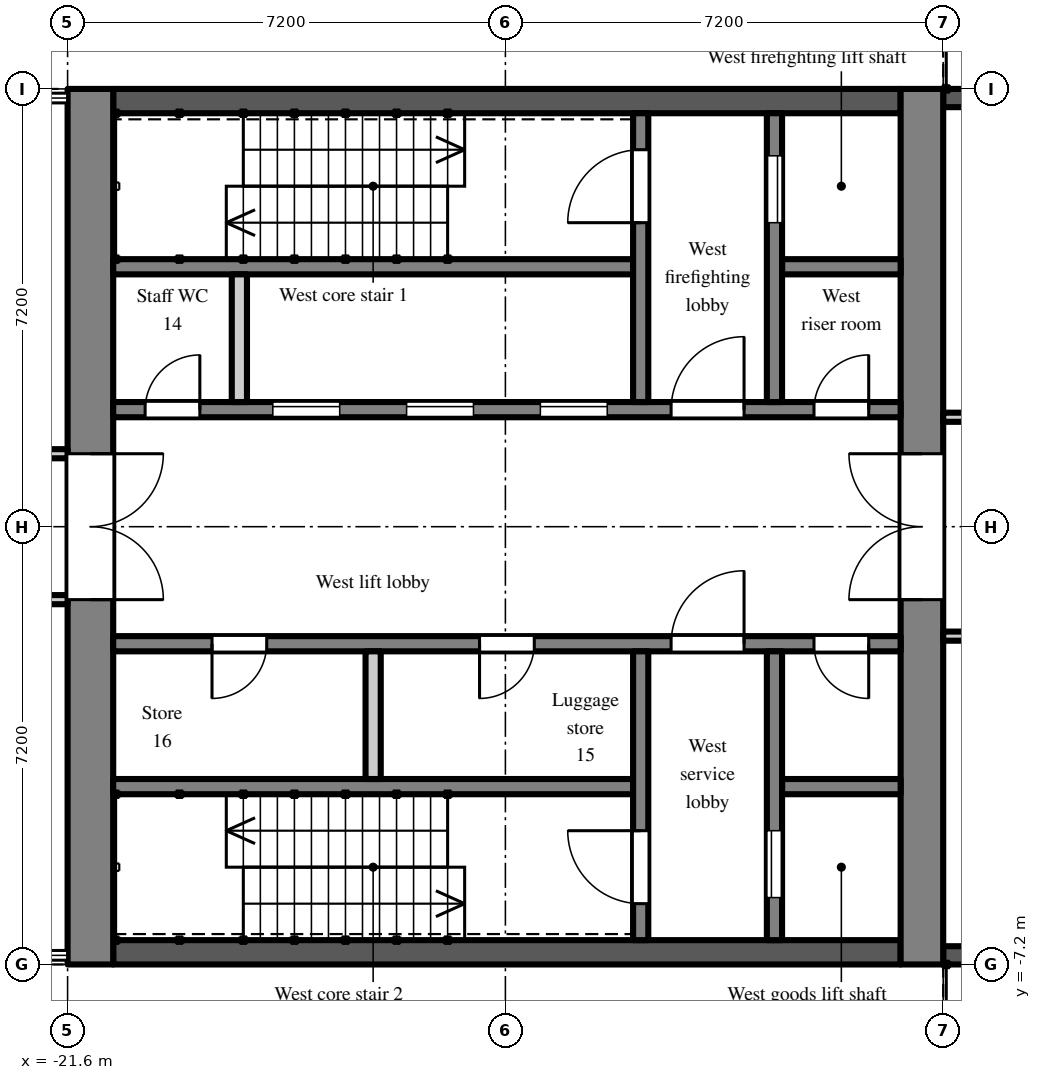
"""IFC4 building model, lengths in metres.
Left out: names, types, materials, properties, quantities, classifications, styles, units other than length and angle.
Written with IfcOpenShell. Run it as: python <this file> out.ifc"""

import sys

from ifc_helpers import new_model, si_unit, direction, frame, frame_2d, origin, place, context, subcontext, project, spatial, rectangle, extrude, element, fill, save


model = new_model("IFC4")
c1 = context("Model", 3, precision=1e-05, world=origin(), true_north=direction((0.0, 1.0)))
c2 = subcontext(c1, "Body", "Model", "MODEL_VIEW")
j1 = project(units=[si_unit("LENGTHUNIT", "METRE"), si_unit("PLANEANGLEUNIT", "RADIAN")], contexts=[c1])
p1 = place(None, origin())
s1 = spatial("IfcSite", under=j1, at=p1, CompositionType="ELEMENT")
p2 = place(p1, origin())
s2 = spatial("IfcBuilding", under=s1, at=p2, CompositionType="ELEMENT")
p3 = place(p2, frame((0.0, 0.0, 237.9)))
s3 = spatial("IfcBuildingStorey", under=s2, at=p3, CompositionType="ELEMENT", Elevation=237.9)
for number, where, z_axis, x_axis in (
    (1, (-4.2, 7.05, 0.0), (0.0, 0.0, 1.0), (-1.0, 0.0, 0.0)),
    (2, (-7.2, -7.05, 0.0), (0.0, 0.0, 1.0), (1.0, 0.0, 0.0)),
):
    element("IfcWall", number, at=place(p3, frame(where, z_axis=z_axis, x_axis=x_axis)), inside=s3, PredefinedType="SOLIDWALL", context=c2, shape_type="SweptSolid", body=[
        extrude(rectangle(XDim=3.0, YDim=0.3, at=frame_2d((1.5, 0.0))), origin(), (0.0, 0.0, 1.0), 3.75),
    ])
p4 = place(p3, frame((-7.55, -7.2, 0.0), z_axis=(0.0, 0.0, 1.0), x_axis=(0.0, 1.0, 0.0)))
e3 = element("IfcWall", 3, at=p4, inside=s3, PredefinedType="SHEAR", context=c2, shape_type="SweptSolid", body=[
    extrude(rectangle(XDim=14.4, YDim=0.7, at=frame_2d((7.2, 0.0))), origin(), (0.0, 0.0, 1.0), 3.75),
])
p5 = place(p4, frame((6.0, 0.0, 0.0)))
e4 = element("IfcOpeningElement", 4, at=p5, cuts=e3, PredefinedType="OPENING", context=c2, shape_type="SweptSolid", body=[
    extrude(rectangle(XDim=2.4, YDim=2.2, at=frame_2d((1.2, 1.1))), frame((0.0, 0.36, 0.0), z_axis=(0.0, -1.0, 0.0), x_axis=(1.0, 0.0, 0.0)), (0.0, 0.0, 1.0), 0.72),
])
p6 = place(p3, frame((-21.225, -7.2, 0.0), z_axis=(0.0, 0.0, 1.0), x_axis=(0.0, 1.0, 0.0)))
e5 = element("IfcWall", 5, at=p6, inside=s3, PredefinedType="SHEAR", context=c2, shape_type="SweptSolid", body=[
    extrude(rectangle(XDim=14.4, YDim=0.75, at=frame_2d((7.2, 0.0))), origin(), (0.0, 0.0, 1.0), 3.75),
])
p7 = place(p6, frame((6.0, 0.0, 0.0)))
e6 = element("IfcOpeningElement", 6, at=p7, cuts=e5, PredefinedType="OPENING", context=c2, shape_type="SweptSolid", body=[
    extrude(rectangle(XDim=2.4, YDim=2.2, at=frame_2d((1.2, 1.1))), frame((0.0, 0.385, 0.0), z_axis=(0.0, -1.0, 0.0), x_axis=(1.0, 0.0, 0.0)), (0.0, 0.0, 1.0), 0.77),
])
p8 = place(p3, frame((-7.9, 7.0, 0.0), z_axis=(0.0, 0.0, 1.0), x_axis=(-1.0, 0.0, 0.0)))
e7 = element("IfcWall", 7, at=p8, inside=s3, PredefinedType="SHEAR", context=c2, shape_type="SweptSolid", body=[
    extrude(rectangle(XDim=12.95, YDim=0.4, at=frame_2d((6.475, 0.0))), origin(), (0.0, 0.0, 1.0), 3.75),
])
p9 = place(p3, frame((-7.9, 1.925, 0.0), z_axis=(0.0, 0.0, 1.0), x_axis=(-1.0, 0.0, 0.0)))
e8 = element("IfcWall", 8, at=p9, inside=s3, PredefinedType="SHEAR", context=c2, shape_type="SweptSolid", body=[
    extrude(rectangle(XDim=12.95, YDim=0.25, at=frame_2d((6.475, 0.0))), origin(), (0.0, 0.0, 1.0), 3.75),
])
p10 = place(p9, frame((4.825, 0.0, 0.0)))
e9 = element("IfcOpeningElement", 9, at=p10, cuts=e8, PredefinedType="OPENING", context=c2, shape_type="SweptSolid", body=[
    extrude(rectangle(XDim=1.1, YDim=2.1, at=frame_2d((0.55, 1.05))), frame((0.0, 0.135, 0.0), z_axis=(0.0, -1.0, 0.0), x_axis=(1.0, 0.0, 0.0)), (0.0, 0.0, 1.0), 0.27),
])
p11 = place(p9, frame((7.025, 0.0, 0.0)))
e10 = element("IfcOpeningElement", 10, at=p11, cuts=e8, PredefinedType="OPENING", context=c2, shape_type="SweptSolid", body=[
    extrude(rectangle(XDim=1.1, YDim=2.1, at=frame_2d((0.55, 1.05))), frame((0.0, 0.135, 0.0), z_axis=(0.0, -1.0, 0.0), x_axis=(1.0, 0.0, 0.0)), (0.0, 0.0, 1.0), 0.27),
])
p12 = place(p9, frame((9.225, 0.0, 0.0)))
e11 = element("IfcOpeningElement", 11, at=p12, cuts=e8, PredefinedType="OPENING", context=c2, shape_type="SweptSolid", body=[
    extrude(rectangle(XDim=1.1, YDim=2.1, at=frame_2d((0.55, 1.05))), frame((0.0, 0.135, 0.0), z_axis=(0.0, -1.0, 0.0), x_axis=(1.0, 0.0, 0.0)), (0.0, 0.0, 1.0), 0.27),
])
p13 = place(p9, frame((0.525, 0.0, 0.0)))
e12 = element("IfcOpeningElement", 12, at=p13, cuts=e8, PredefinedType="OPENING", context=c2, shape_type="SweptSolid", body=[
    extrude(rectangle(XDim=0.9, YDim=2.1, at=frame_2d((0.45, 1.05))), frame((0.0, 0.135, 0.0), z_axis=(0.0, -1.0, 0.0), x_axis=(1.0, 0.0, 0.0)), (0.0, 0.0, 1.0), 0.27),
])
p14 = place(p9, frame((2.575, 0.0, 0.0)))
e13 = element("IfcOpeningElement", 13, at=p14, cuts=e8, PredefinedType="OPENING", context=c2, shape_type="SweptSolid", body=[
    extrude(rectangle(XDim=1.2, YDim=2.1, at=frame_2d((0.6, 1.05))), frame((0.0, 0.135, 0.0), z_axis=(0.0, -1.0, 0.0), x_axis=(1.0, 0.0, 0.0)), (0.0, 0.0, 1.0), 0.27),
])
p15 = place(p9, frame((11.525, 0.0, 0.0)))
e14 = element("IfcOpeningElement", 14, at=p15, cuts=e8, PredefinedType="OPENING", context=c2, shape_type="SweptSolid", body=[
    extrude(rectangle(XDim=0.9, YDim=2.1, at=frame_2d((0.45, 1.05))), frame((0.0, 0.135, 0.0), z_axis=(0.0, -1.0, 0.0), x_axis=(1.0, 0.0, 0.0)), (0.0, 0.0, 1.0), 0.27),
])
p16 = place(p3, frame((-7.9, 4.275, 0.0), z_axis=(0.0, 0.0, 1.0), x_axis=(-1.0, 0.0, 0.0)))
e15 = element("IfcWall", 15, at=p16, inside=s3, PredefinedType="SHEAR", context=c2, shape_type="SweptSolid", body=[
    extrude(rectangle(XDim=1.95, YDim=0.25, at=frame_2d((0.975, 0.0))), origin(), (0.0, 0.0, 1.0), 3.75),
])
p17 = place(p3, frame((-12.3, 4.275, 0.0), z_axis=(0.0, 0.0, 1.0), x_axis=(-1.0, 0.0, 0.0)))
e16 = element("IfcWall", 16, at=p17, inside=s3, PredefinedType="SHEAR", context=c2, shape_type="SweptSolid", body=[
    extrude(rectangle(XDim=8.55, YDim=0.25, at=frame_2d((4.275, 0.0))), origin(), (0.0, 0.0, 1.0), 3.75),
])
p18 = place(p3, frame((-9.975, 2.05, 0.0), z_axis=(0.0, 0.0, 1.0), x_axis=(0.0, 1.0, 0.0)))
e17 = element("IfcWall", 17, at=p18, inside=s3, PredefinedType="SHEAR", context=c2, shape_type="SweptSolid", body=[
    extrude(rectangle(XDim=4.75, YDim=0.25, at=frame_2d((2.375, 0.0))), origin(), (0.0, 0.0, 1.0), 3.75),
])
p19 = place(p18, frame((2.95, 0.0, 0.0)))
e18 = element("IfcOpeningElement", 18, at=p19, cuts=e17, PredefinedType="OPENING", context=c2, shape_type="SweptSolid", body=[
    extrude(rectangle(XDim=1.1, YDim=2.1, at=frame_2d((0.55, 1.05))), frame((0.0, 0.135, 0.0), z_axis=(0.0, -1.0, 0.0), x_axis=(1.0, 0.0, 0.0)), (0.0, 0.0, 1.0), 0.27),
])
p20 = place(p3, frame((-12.175, 2.05, 0.0), z_axis=(0.0, 0.0, 1.0), x_axis=(0.0, 1.0, 0.0)))
e19 = element("IfcWall", 19, at=p20, inside=s3, PredefinedType="SHEAR", context=c2, shape_type="SweptSolid", body=[
    extrude(rectangle(XDim=4.75, YDim=0.25, at=frame_2d((2.375, 0.0))), origin(), (0.0, 0.0, 1.0), 3.75),
])
p21 = place(p20, frame((2.95, 0.0, 0.0)))
e20 = element("IfcOpeningElement", 20, at=p21, cuts=e19, PredefinedType="OPENING", context=c2, shape_type="SweptSolid", body=[
    extrude(rectangle(XDim=1.2, YDim=2.1, at=frame_2d((0.6, 1.05))), frame((0.0, 0.135, 0.0), z_axis=(0.0, -1.0, 0.0), x_axis=(1.0, 0.0, 0.0)), (0.0, 0.0, 1.0), 0.27),
])
p22 = place(p3, frame((-18.775, 2.05, 0.0), z_axis=(0.0, 0.0, 1.0), x_axis=(0.0, 1.0, 0.0)))
e21 = element("IfcWall", 21, at=p22, inside=s3, PredefinedType="PARTITIONING", context=c2, shape_type="SweptSolid", body=[
    extrude(rectangle(XDim=2.1, YDim=0.25, at=frame_2d((1.05, 0.0))), origin(), (0.0, 0.0, 1.0), 3.75),
])
p23 = place(p3, frame((-7.9, -7.0, 0.0), z_axis=(0.0, 0.0, 1.0), x_axis=(-1.0, 0.0, 0.0)))
e22 = element("IfcWall", 22, at=p23, inside=s3, PredefinedType="SHEAR", context=c2, shape_type="SweptSolid", body=[
    extrude(rectangle(XDim=12.95, YDim=0.4, at=frame_2d((6.475, 0.0))), origin(), (0.0, 0.0, 1.0), 3.75),
])
p24 = place(p3, frame((-7.9, -1.925, 0.0), z_axis=(0.0, 0.0, 1.0), x_axis=(-1.0, 0.0, 0.0)))
e23 = element("IfcWall", 23, at=p24, inside=s3, PredefinedType="SHEAR", context=c2, shape_type="SweptSolid", body=[
    extrude(rectangle(XDim=12.95, YDim=0.25, at=frame_2d((6.475, 0.0))), origin(), (0.0, 0.0, 1.0), 3.75),
])
p25 = place(p24, frame((0.525, 0.0, 0.0)))
e24 = element("IfcOpeningElement", 24, at=p25, cuts=e23, PredefinedType="OPENING", context=c2, shape_type="SweptSolid", body=[
    extrude(rectangle(XDim=0.9, YDim=2.1, at=frame_2d((0.45, 1.05))), frame((0.0, 0.135, 0.0), z_axis=(0.0, -1.0, 0.0), x_axis=(1.0, 0.0, 0.0)), (0.0, 0.0, 1.0), 0.27),
])
p26 = place(p24, frame((2.575, 0.0, 0.0)))
e25 = element("IfcOpeningElement", 25, at=p26, cuts=e23, PredefinedType="OPENING", context=c2, shape_type="SweptSolid", body=[
    extrude(rectangle(XDim=1.2, YDim=2.1, at=frame_2d((0.6, 1.05))), frame((0.0, 0.135, 0.0), z_axis=(0.0, -1.0, 0.0), x_axis=(1.0, 0.0, 0.0)), (0.0, 0.0, 1.0), 0.27),
])
p27 = place(p24, frame((6.025, 0.0, 0.0)))
e26 = element("IfcOpeningElement", 26, at=p27, cuts=e23, PredefinedType="OPENING", context=c2, shape_type="SweptSolid", body=[
    extrude(rectangle(XDim=0.9, YDim=2.1, at=frame_2d((0.45, 1.05))), frame((0.0, 0.135, 0.0), z_axis=(0.0, -1.0, 0.0), x_axis=(1.0, 0.0, 0.0)), (0.0, 0.0, 1.0), 0.27),
])
p28 = place(p24, frame((10.425, 0.0, 0.0)))
e27 = element("IfcOpeningElement", 27, at=p28, cuts=e23, PredefinedType="OPENING", context=c2, shape_type="SweptSolid", body=[
    extrude(rectangle(XDim=0.9, YDim=2.1, at=frame_2d((0.45, 1.05))), frame((0.0, 0.135, 0.0), z_axis=(0.0, -1.0, 0.0), x_axis=(1.0, 0.0, 0.0)), (0.0, 0.0, 1.0), 0.27),
])
p29 = place(p3, frame((-7.9, -4.275, 0.0), z_axis=(0.0, 0.0, 1.0), x_axis=(-1.0, 0.0, 0.0)))
e28 = element("IfcWall", 28, at=p29, inside=s3, PredefinedType="SHEAR", context=c2, shape_type="SweptSolid", body=[
    extrude(rectangle(XDim=1.95, YDim=0.25, at=frame_2d((0.975, 0.0))), origin(), (0.0, 0.0, 1.0), 3.75),
])
p30 = place(p3, frame((-12.3, -4.275, 0.0), z_axis=(0.0, 0.0, 1.0), x_axis=(-1.0, 0.0, 0.0)))
e29 = element("IfcWall", 29, at=p30, inside=s3, PredefinedType="SHEAR", context=c2, shape_type="SweptSolid", body=[
    extrude(rectangle(XDim=8.55, YDim=0.25, at=frame_2d((4.275, 0.0))), origin(), (0.0, 0.0, 1.0), 3.75),
])
p31 = place(p3, frame((-9.975, -2.05, 0.0), z_axis=(0.0, 0.0, 1.0), x_axis=(0.0, -1.0, 0.0)))
e30 = element("IfcWall", 30, at=p31, inside=s3, PredefinedType="SHEAR", context=c2, shape_type="SweptSolid", body=[
    extrude(rectangle(XDim=4.75, YDim=0.25, at=frame_2d((2.375, 0.0))), origin(), (0.0, 0.0, 1.0), 3.75),
])
p32 = place(p31, frame((2.95, 0.0, 0.0)))
e31 = element("IfcOpeningElement", 31, at=p32, cuts=e30, PredefinedType="OPENING", context=c2, shape_type="SweptSolid", body=[
    extrude(rectangle(XDim=1.1, YDim=2.1, at=frame_2d((0.55, 1.05))), frame((0.0, 0.135, 0.0), z_axis=(0.0, -1.0, 0.0), x_axis=(1.0, 0.0, 0.0)), (0.0, 0.0, 1.0), 0.27),
])
p33 = place(p3, frame((-12.175, -2.05, 0.0), z_axis=(0.0, 0.0, 1.0), x_axis=(0.0, -1.0, 0.0)))
e32 = element("IfcWall", 32, at=p33, inside=s3, PredefinedType="SHEAR", context=c2, shape_type="SweptSolid", body=[
    extrude(rectangle(XDim=4.75, YDim=0.25, at=frame_2d((2.375, 0.0))), origin(), (0.0, 0.0, 1.0), 3.75),
])
p34 = place(p33, frame((2.95, 0.0, 0.0)))
e33 = element("IfcOpeningElement", 33, at=p34, cuts=e32, PredefinedType="OPENING", context=c2, shape_type="SweptSolid", body=[
    extrude(rectangle(XDim=1.2, YDim=2.1, at=frame_2d((0.6, 1.05))), frame((0.0, 0.135, 0.0), z_axis=(0.0, -1.0, 0.0), x_axis=(1.0, 0.0, 0.0)), (0.0, 0.0, 1.0), 0.27),
])
p35 = place(p3, frame((-16.575, -2.05, 0.0), z_axis=(0.0, 0.0, 1.0), x_axis=(0.0, -1.0, 0.0)))
e34 = element("IfcWall", 34, at=p35, inside=s3, PredefinedType="PARTITIONING", context=c2, shape_type="SweptSolid", body=[
    extrude(rectangle(XDim=2.1, YDim=0.25, at=frame_2d((1.05, 0.0))), origin(), (0.0, 0.0, 1.0), 3.75),
])
p36 = place(p3, frame((-25.125, -1.2, 0.0), z_axis=(0.0, 0.0, 1.0), x_axis=(1.0, 0.0, 0.0)))
e35 = element("IfcWall", 35, at=p36, inside=s3, PredefinedType="PARTITIONING", context=c2, shape_type="SweptSolid", body=[
    extrude(rectangle(XDim=3.525, YDim=0.15, at=frame_2d((1.762, 0.0))), origin(), (0.0, 0.0, 1.0), 3.75),
])
p37 = place(p36, frame((1.275, 0.0, 0.0)))
e36 = element("IfcOpeningElement", 36, at=p37, cuts=e35, PredefinedType="OPENING", context=c2, shape_type="SweptSolid", body=[
    extrude(rectangle(XDim=0.9, YDim=2.1, at=frame_2d((0.45, 1.05))), frame((0.0, 0.085, 0.0), z_axis=(0.0, -1.0, 0.0), x_axis=(1.0, 0.0, 0.0)), (0.0, 0.0, 1.0), 0.17),
])
p38 = place(p3, frame((-25.125, 1.2, 0.0), z_axis=(0.0, 0.0, 1.0), x_axis=(1.0, 0.0, 0.0)))
e37 = element("IfcWall", 37, at=p38, inside=s3, PredefinedType="PARTITIONING", context=c2, shape_type="SweptSolid", body=[
    extrude(rectangle(XDim=3.525, YDim=0.15, at=frame_2d((1.762, 0.0))), origin(), (0.0, 0.0, 1.0), 3.75),
])
p39 = place(p38, frame((1.275, 0.0, 0.0)))
e38 = element("IfcOpeningElement", 38, at=p39, cuts=e37, PredefinedType="OPENING", context=c2, shape_type="SweptSolid", body=[
    extrude(rectangle(XDim=0.9, YDim=2.1, at=frame_2d((0.45, 1.05))), frame((0.0, 0.085, 0.0), z_axis=(0.0, -1.0, 0.0), x_axis=(1.0, 0.0, 0.0)), (0.0, 0.0, 1.0), 0.17),
])
p40 = place(p3, frame((-7.2, -1.8, 0.0), z_axis=(0.0, 0.0, 1.0), x_axis=(1.0, 0.0, 0.0)))
e39 = element("IfcWall", 39, at=p40, inside=s3, PredefinedType="PARTITIONING", context=c2, shape_type="SweptSolid", body=[
    extrude(rectangle(XDim=5.325, YDim=0.15, at=frame_2d((2.663, 0.0))), origin(), (0.0, 0.0, 1.0), 3.75),
])
p41 = place(p40, frame((1.17, 0.0, 0.0)))
e40 = element("IfcOpeningElement", 40, at=p41, cuts=e39, PredefinedType="OPENING", context=c2, shape_type="SweptSolid", body=[
    extrude(rectangle(XDim=0.9, YDim=2.1, at=frame_2d((0.45, 1.05))), frame((0.0, 0.085, 0.0), z_axis=(0.0, -1.0, 0.0), x_axis=(1.0, 0.0, 0.0)), (0.0, 0.0, 1.0), 0.17),
])
p42 = place(p3, frame((-7.2, 1.8, 0.0), z_axis=(0.0, 0.0, 1.0), x_axis=(1.0, 0.0, 0.0)))
e41 = element("IfcWall", 41, at=p42, inside=s3, PredefinedType="PARTITIONING", context=c2, shape_type="SweptSolid", body=[
    extrude(rectangle(XDim=5.325, YDim=0.15, at=frame_2d((2.663, 0.0))), origin(), (0.0, 0.0, 1.0), 3.75),
])
p43 = place(p42, frame((1.035, 0.0, 0.0)))
e42 = element("IfcOpeningElement", 42, at=p43, cuts=e41, PredefinedType="OPENING", context=c2, shape_type="SweptSolid", body=[
    extrude(rectangle(XDim=0.9, YDim=2.1, at=frame_2d((0.45, 1.05))), frame((0.0, 0.085, 0.0), z_axis=(0.0, -1.0, 0.0), x_axis=(1.0, 0.0, 0.0)), (0.0, 0.0, 1.0), 0.17),
])
p44 = place(p10, origin())
e43 = element("IfcDoor", 43, at=p44, inside=s3, OperationType="SLIDING_TO_LEFT", PredefinedType="DOOR", context=c2, shape_type="SweptSolid", body=[
    extrude(rectangle(XDim=1.1, YDim=2.1, at=frame_2d((0.55, 1.05))), frame((0.0, 0.025, 0.0), z_axis=(0.0, -1.0, 0.0), x_axis=(1.0, 0.0, 0.0)), (0.0, 0.0, 1.0), 0.05),
])
fill(e9, e43)
p45 = place(p11, origin())
e44 = element("IfcDoor", 44, at=p45, inside=s3, OperationType="SLIDING_TO_LEFT", PredefinedType="DOOR", context=c2, shape_type="SweptSolid", body=[
    extrude(rectangle(XDim=1.1, YDim=2.1, at=frame_2d((0.55, 1.05))), frame((0.0, 0.025, 0.0), z_axis=(0.0, -1.0, 0.0), x_axis=(1.0, 0.0, 0.0)), (0.0, 0.0, 1.0), 0.05),
])
fill(e10, e44)
p46 = place(p12, origin())
e45 = element("IfcDoor", 45, at=p46, inside=s3, OperationType="SLIDING_TO_LEFT", PredefinedType="DOOR", context=c2, shape_type="SweptSolid", body=[
    extrude(rectangle(XDim=1.1, YDim=2.1, at=frame_2d((0.55, 1.05))), frame((0.0, 0.025, 0.0), z_axis=(0.0, -1.0, 0.0), x_axis=(1.0, 0.0, 0.0)), (0.0, 0.0, 1.0), 0.05),
])
fill(e11, e45)
p47 = place(p19, origin())
e46 = element("IfcDoor", 46, at=p47, inside=s3, OperationType="SLIDING_TO_LEFT", PredefinedType="DOOR", context=c2, shape_type="SweptSolid", body=[
    extrude(rectangle(XDim=1.1, YDim=2.1, at=frame_2d((0.55, 1.05))), frame((0.0, 0.025, 0.0), z_axis=(0.0, -1.0, 0.0), x_axis=(1.0, 0.0, 0.0)), (0.0, 0.0, 1.0), 0.05),
])
fill(e18, e46)
p48 = place(p32, origin())
e47 = element("IfcDoor", 47, at=p48, inside=s3, OperationType="SLIDING_TO_LEFT", PredefinedType="DOOR", context=c2, shape_type="SweptSolid", body=[
    extrude(rectangle(XDim=1.1, YDim=2.1, at=frame_2d((0.55, 1.05))), frame((0.0, 0.025, 0.0), z_axis=(0.0, -1.0, 0.0), x_axis=(1.0, 0.0, 0.0)), (0.0, 0.0, 1.0), 0.05),
])
fill(e31, e47)
p49 = place(p21, origin())
e48 = element("IfcDoor", 48, at=p49, inside=s3, OperationType="SINGLE_SWING_LEFT", PredefinedType="DOOR", context=c2, shape_type="SweptSolid", body=[
    extrude(rectangle(XDim=1.2, YDim=2.1, at=frame_2d((0.6, 1.05))), frame((0.0, 0.025, 0.0), z_axis=(0.0, -1.0, 0.0), x_axis=(1.0, 0.0, 0.0)), (0.0, 0.0, 1.0), 0.05),
])
fill(e20, e48)
p50 = place(p34, frame((1.2, 0.0, 0.0), z_axis=(0.0, 0.0, 1.0), x_axis=(-1.0, 0.0, 0.0)))
e49 = element("IfcDoor", 49, at=p50, inside=s3, OperationType="SINGLE_SWING_RIGHT", PredefinedType="DOOR", context=c2, shape_type="SweptSolid", body=[
    extrude(rectangle(XDim=1.2, YDim=2.1, at=frame_2d((0.6, 1.05))), frame((0.0, 0.025, 0.0), z_axis=(0.0, -1.0, 0.0), x_axis=(1.0, 0.0, 0.0)), (0.0, 0.0, 1.0), 0.05),
])
fill(e33, e49)
p51 = place(p13, frame((0.9, 0.0, 0.0), z_axis=(0.0, 0.0, 1.0), x_axis=(-1.0, 0.0, 0.0)))
e50 = element("IfcDoor", 50, at=p51, inside=s3, OperationType="SINGLE_SWING_RIGHT", PredefinedType="DOOR", context=c2, shape_type="SweptSolid", body=[
    extrude(rectangle(XDim=0.9, YDim=2.1, at=frame_2d((0.45, 1.05))), frame((0.0, 0.025, 0.0), z_axis=(0.0, -1.0, 0.0), x_axis=(1.0, 0.0, 0.0)), (0.0, 0.0, 1.0), 0.05),
])
fill(e12, e50)
p52 = place(p25, origin())
e51 = element("IfcDoor", 51, at=p52, inside=s3, OperationType="SINGLE_SWING_LEFT", PredefinedType="DOOR", context=c2, shape_type="SweptSolid", body=[
    extrude(rectangle(XDim=0.9, YDim=2.1, at=frame_2d((0.45, 1.05))), frame((0.0, 0.025, 0.0), z_axis=(0.0, -1.0, 0.0), x_axis=(1.0, 0.0, 0.0)), (0.0, 0.0, 1.0), 0.05),
])
fill(e24, e51)
p53 = place(p14, frame((1.2, 0.0, 0.0), z_axis=(0.0, 0.0, 1.0), x_axis=(-1.0, 0.0, 0.0)))
e52 = element("IfcDoor", 52, at=p53, inside=s3, OperationType="SINGLE_SWING_RIGHT", PredefinedType="DOOR", context=c2, shape_type="SweptSolid", body=[
    extrude(rectangle(XDim=1.2, YDim=2.1, at=frame_2d((0.6, 1.05))), frame((0.0, 0.025, 0.0), z_axis=(0.0, -1.0, 0.0), x_axis=(1.0, 0.0, 0.0)), (0.0, 0.0, 1.0), 0.05),
])
fill(e13, e52)
p54 = place(p26, frame((1.2, 0.0, 0.0), z_axis=(0.0, 0.0, 1.0), x_axis=(-1.0, 0.0, 0.0)))
e53 = element("IfcDoor", 53, at=p54, inside=s3, OperationType="SINGLE_SWING_RIGHT", PredefinedType="DOOR", context=c2, shape_type="SweptSolid", body=[
    extrude(rectangle(XDim=1.2, YDim=2.1, at=frame_2d((0.6, 1.05))), frame((0.0, 0.025, 0.0), z_axis=(0.0, -1.0, 0.0), x_axis=(1.0, 0.0, 0.0)), (0.0, 0.0, 1.0), 0.05),
])
fill(e25, e53)
p55 = place(p5, origin())
e54 = element("IfcDoor", 54, at=p55, inside=s3, OperationType="DOUBLE_DOOR_DOUBLE_SWING", PredefinedType="DOOR", context=c2, shape_type="SweptSolid", body=[
    extrude(rectangle(XDim=2.4, YDim=2.2, at=frame_2d((1.2, 1.1))), frame((0.0, 0.025, 0.0), z_axis=(0.0, -1.0, 0.0), x_axis=(1.0, 0.0, 0.0)), (0.0, 0.0, 1.0), 0.05),
])
fill(e4, e54)
p56 = place(p7, frame((2.4, 0.0, 0.0), z_axis=(0.0, 0.0, 1.0), x_axis=(-1.0, 0.0, 0.0)))
e55 = element("IfcDoor", 55, at=p56, inside=s3, OperationType="DOUBLE_DOOR_DOUBLE_SWING", PredefinedType="DOOR", context=c2, shape_type="SweptSolid", body=[
    extrude(rectangle(XDim=2.4, YDim=2.2, at=frame_2d((1.2, 1.1))), frame((0.0, 0.025, 0.0), z_axis=(0.0, -1.0, 0.0), x_axis=(1.0, 0.0, 0.0)), (0.0, 0.0, 1.0), 0.05),
])
fill(e6, e55)
p57 = place(p15, frame((0.9, 0.0, 0.0), z_axis=(0.0, 0.0, 1.0), x_axis=(-1.0, 0.0, 0.0)))
e56 = element("IfcDoor", 56, at=p57, inside=s3, OperationType="SINGLE_SWING_RIGHT", PredefinedType="DOOR", context=c2, shape_type="SweptSolid", body=[
    extrude(rectangle(XDim=0.9, YDim=2.1, at=frame_2d((0.45, 1.05))), frame((0.0, 0.025, 0.0), z_axis=(0.0, -1.0, 0.0), x_axis=(1.0, 0.0, 0.0)), (0.0, 0.0, 1.0), 0.05),
])
fill(e14, e56)
p58 = place(p27, origin())
e57 = element("IfcDoor", 57, at=p58, inside=s3, OperationType="SINGLE_SWING_RIGHT", PredefinedType="DOOR", context=c2, shape_type="SweptSolid", body=[
    extrude(rectangle(XDim=0.9, YDim=2.1, at=frame_2d((0.45, 1.05))), frame((0.0, 0.025, 0.0), z_axis=(0.0, -1.0, 0.0), x_axis=(1.0, 0.0, 0.0)), (0.0, 0.0, 1.0), 0.05),
])
fill(e26, e57)
p59 = place(p28, origin())
e58 = element("IfcDoor", 58, at=p59, inside=s3, OperationType="SINGLE_SWING_RIGHT", PredefinedType="DOOR", context=c2, shape_type="SweptSolid", body=[
    extrude(rectangle(XDim=0.9, YDim=2.1, at=frame_2d((0.45, 1.05))), frame((0.0, 0.025, 0.0), z_axis=(0.0, -1.0, 0.0), x_axis=(1.0, 0.0, 0.0)), (0.0, 0.0, 1.0), 0.05),
])
fill(e27, e58)
save(model, sys.argv[1])
